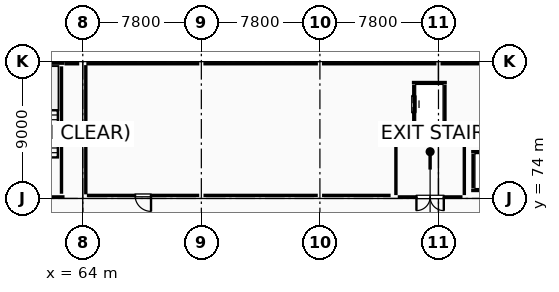
"""IFC4 building model, lengths in metres.
Left out: names, types, materials, properties, quantities, classifications, styles, units other than length and angle.
Written with IfcOpenShell. Run it as: python <this file> out.ifc"""

import sys

from ifc_helpers import new_model, si_unit, direction, frame, frame_2d, origin, origin_2d, place, context, subcontext, project, spatial, rectangle, hollow_rectangle, i_section, extrude, element, fill, save


model = new_model("IFC4")
c1 = context("Model", 3, precision=1e-05, world=origin(), true_north=direction((0.0, 1.0)))
c2 = subcontext(c1, "Body", "Model", "MODEL_VIEW")
j1 = project(units=[si_unit("LENGTHUNIT", "METRE"), si_unit("PLANEANGLEUNIT", "RADIAN")], contexts=[c1])
p1 = place(None, origin())
s1 = spatial("IfcSite", under=j1, at=p1, CompositionType="ELEMENT")
p2 = place(p1, origin())
s2 = spatial("IfcBuilding", under=s1, at=p2, CompositionType="ELEMENT")
p3 = place(p2, frame((0.0, 0.0, 19.8)))
s3 = spatial("IfcBuildingStorey", under=s2, at=p3, CompositionType="ELEMENT", Elevation=19.8)
p4 = place(p3, frame((64.0, 74.0, 0.0), z_axis=(0.0, 0.0, 1.0), x_axis=(1.0, 0.0, 0.0)))
e1 = element("IfcColumn", 1, at=p4, inside=s3, PredefinedType="COLUMN", context=c2, shape_type="SweptSolid", body=[
    extrude(i_section(OverallWidth=0.25, OverallDepth=0.45, WebThickness=0.011, FlangeThickness=0.014, FilletRadius=0.015, at=origin_2d()), origin(), (0.0, 0.0, 1.0), 4.5),
])
p5 = place(p3, frame((64.0, 83.0, 0.0), z_axis=(0.0, 0.0, 1.0), x_axis=(1.0, 0.0, 0.0)))
e2 = element("IfcColumn", 2, at=p5, inside=s3, PredefinedType="COLUMN", context=c2, shape_type="SweptSolid", body=[
    extrude(hollow_rectangle(XDim=0.45, YDim=0.45, WallThickness=0.02, at=origin_2d()), origin(), (0.0, 0.0, 1.0), 4.5),
])
for number, where, z_axis, x_axis in (
    (3, (71.8, 74.0, 0.0), (0.0, 0.0, 1.0), (1.0, 0.0, 0.0)),
    (4, (71.8, 83.0, 0.0), (0.0, 0.0, 1.0), (1.0, 0.0, 0.0)),
    (5, (79.6, 74.0, 0.0), (0.0, 0.0, 1.0), (1.0, 0.0, 0.0)),
    (6, (79.6, 83.0, 0.0), (0.0, 0.0, 1.0), (1.0, 0.0, 0.0)),
    (7, (87.4, 83.0, 0.0), (0.0, 0.0, 1.0), (1.0, 0.0, 0.0)),
):
    element("IfcColumn", number, at=place(p3, frame(where, z_axis=z_axis, x_axis=x_axis)), inside=s3, PredefinedType="COLUMN", context=c2, shape_type="SweptSolid", body=[
        extrude(i_section(OverallWidth=0.25, OverallDepth=0.45, WebThickness=0.011, FlangeThickness=0.014, FilletRadius=0.015, at=origin_2d()), origin(), (0.0, 0.0, 1.0), 4.5),
    ])
p6 = place(p3, frame((62.804, 82.86, 0.0), z_axis=(0.0, 0.0, 1.0), x_axis=(1.0, 0.0, 0.0)))
e8 = element("IfcWall", 8, at=p6, inside=s3, PredefinedType="ELEMENTEDWALL", context=c2, shape_type="SweptSolid", body=[
    extrude(rectangle(XDim=0.963, YDim=0.24, at=frame_2d((0.481, 0.0))), origin(), (0.0, 0.0, 1.0), 4.25),
])
p7 = place(p3, frame((64.233, 82.86, 0.0), z_axis=(0.0, 0.0, 1.0), x_axis=(1.0, 0.0, 0.0)))
e9 = element("IfcWall", 9, at=p7, inside=s3, PredefinedType="ELEMENTEDWALL", context=c2, shape_type="SweptSolid", body=[
    extrude(rectangle(XDim=7.434, YDim=0.24, at=frame_2d((3.717, 0.0))), origin(), (0.0, 0.0, 1.0), 3.485),
])
p8 = place(p3, frame((71.933, 82.86, 0.0), z_axis=(0.0, 0.0, 1.0), x_axis=(1.0, 0.0, 0.0)))
e10 = element("IfcWall", 10, at=p8, inside=s3, PredefinedType="ELEMENTEDWALL", context=c2, shape_type="SweptSolid", body=[
    extrude(rectangle(XDim=7.534, YDim=0.24, at=frame_2d((3.767, 0.0))), origin(), (0.0, 0.0, 1.0), 3.585),
])
p9 = place(p3, frame((79.733, 82.86, 0.0), z_axis=(0.0, 0.0, 1.0), x_axis=(1.0, 0.0, 0.0)))
e11 = element("IfcWall", 11, at=p9, inside=s3, PredefinedType="ELEMENTEDWALL", context=c2, shape_type="SweptSolid", body=[
    extrude(rectangle(XDim=7.534, YDim=0.24, at=frame_2d((3.767, 0.0))), origin(), (0.0, 0.0, 1.0), 3.785),
])
p10 = place(p3, frame((87.533, 82.86, 0.0), z_axis=(0.0, 0.0, 1.0), x_axis=(1.0, 0.0, 0.0)))
e12 = element("IfcWall", 12, at=p10, inside=s3, PredefinedType="ELEMENTEDWALL", context=c2, shape_type="SweptSolid", body=[
    extrude(rectangle(XDim=5.863, YDim=0.24, at=frame_2d((2.932, 0.0))), origin(), (0.0, 0.0, 1.0), 4.25),
])
p11 = place(p3, frame((54.4, 74.1, 0.0), z_axis=(0.0, 0.0, 1.0), x_axis=(1.0, 0.0, 0.0)))
e13 = element("IfcWall", 13, at=p11, inside=s3, PredefinedType="SHEAR", context=c2, shape_type="SweptSolid", body=[
    extrude(rectangle(XDim=8.4, YDim=0.4, at=frame_2d((4.2, 0.0))), origin(), (0.0, 0.0, 1.0), 4.25),
])
p12 = place(p11, frame((3.55, 0.0, 0.0)))
e14 = element("IfcOpeningElement", 14, at=p12, cuts=e13, PredefinedType="OPENING", context=c2, shape_type="SweptSolid", body=[
    extrude(rectangle(XDim=1.3, YDim=2.15, at=frame_2d((0.65, 1.075))), frame((0.0, 0.21, 0.0), z_axis=(0.0, -1.0, 0.0), x_axis=(1.0, 0.0, 0.0)), (0.0, 0.0, 1.0), 0.42),
])
p13 = place(p3, frame((62.8, 82.9, 0.0), z_axis=(0.0, 0.0, 1.0), x_axis=(-1.0, 0.0, 0.0)))
e15 = element("IfcWall", 15, at=p13, inside=s3, PredefinedType="SHEAR", context=c2, shape_type="SweptSolid", body=[
    extrude(rectangle(XDim=8.4, YDim=0.4, at=frame_2d((4.2, 0.0))), origin(), (0.0, 0.0, 1.0), 4.25),
])
p14 = place(p3, frame((62.6, 74.31, 0.0), z_axis=(0.0, 0.0, 1.0), x_axis=(0.0, 1.0, 0.0)))
e16 = element("IfcWall", 16, at=p14, inside=s3, PredefinedType="SHEAR", context=c2, shape_type="SweptSolid", body=[
    extrude(rectangle(XDim=8.38, YDim=0.4, at=frame_2d((4.19, 0.0))), origin(), (0.0, 0.0, 1.0), 4.25),
])
p15 = place(p3, frame((89.55, 74.525, 0.0), z_axis=(0.0, 0.0, 1.0), x_axis=(1.0, 0.0, 0.0)))
e17 = element("IfcWall", 17, at=p15, inside=s3, PredefinedType="STANDARD", context=c2, shape_type="SweptSolid", body=[
    extrude(rectangle(XDim=2.5, YDim=0.25, at=frame_2d((1.25, 0.0))), origin(), (0.0, 0.0, 1.0), 4.24),
])
p16 = place(p15, frame((0.65, 0.0, 0.0)))
e18 = element("IfcOpeningElement", 18, at=p16, cuts=e17, PredefinedType="OPENING", context=c2, shape_type="SweptSolid", body=[
    extrude(rectangle(XDim=1.2, YDim=2.05, at=frame_2d((0.6, 1.025))), frame((0.0, 0.135, 0.0), z_axis=(0.0, -1.0, 0.0), x_axis=(1.0, 0.0, 0.0)), (0.0, 0.0, 1.0), 0.27),
])
p17 = place(p3, frame((92.05, 77.075, 0.0), z_axis=(0.0, 0.0, 1.0), x_axis=(-1.0, 0.0, 0.0)))
e19 = element("IfcWall", 19, at=p17, inside=s3, PredefinedType="STANDARD", context=c2, shape_type="SweptSolid", body=[
    extrude(rectangle(XDim=2.5, YDim=0.25, at=frame_2d((1.25, 0.0))), origin(), (0.0, 0.0, 1.0), 4.24),
])
p18 = place(p3, frame((89.675, 76.94, 0.0), z_axis=(0.0, 0.0, 1.0), x_axis=(0.0, -1.0, 0.0)))
e20 = element("IfcWall", 20, at=p18, inside=s3, PredefinedType="STANDARD", context=c2, shape_type="SweptSolid", body=[
    extrude(rectangle(XDim=2.28, YDim=0.25, at=frame_2d((1.14, 0.0))), origin(), (0.0, 0.0, 1.0), 4.24),
])
for number, where, z_axis, x_axis in (
    (21, (85.65, 78.775, 0.0), (0.0, 0.0, 1.0), (1.0, 0.0, 0.0)),
    (22, (87.95, 81.625, 0.0), (0.0, 0.0, 1.0), (-1.0, 0.0, 0.0)),
):
    element("IfcWall", number, at=place(p3, frame(where, z_axis=z_axis, x_axis=x_axis)), inside=s3, PredefinedType="STANDARD", context=c2, shape_type="SweptSolid", body=[
        extrude(rectangle(XDim=2.3, YDim=0.25, at=frame_2d((1.15, 0.0))), origin(), (0.0, 0.0, 1.0), 4.24),
    ])
p19 = place(p3, frame((87.825, 78.91, 0.0), z_axis=(0.0, 0.0, 1.0), x_axis=(0.0, 1.0, 0.0)))
e23 = element("IfcWall", 23, at=p19, inside=s3, PredefinedType="STANDARD", context=c2, shape_type="SweptSolid", body=[
    extrude(rectangle(XDim=2.58, YDim=0.25, at=frame_2d((1.29, 0.0))), origin(), (0.0, 0.0, 1.0), 4.24),
])
p20 = place(p3, frame((85.775, 81.49, 0.0), z_axis=(0.0, 0.0, 1.0), x_axis=(0.0, -1.0, 0.0)))
e24 = element("IfcWall", 24, at=p20, inside=s3, PredefinedType="STANDARD", context=c2, shape_type="SweptSolid", body=[
    extrude(rectangle(XDim=2.58, YDim=0.25, at=frame_2d((1.29, 0.0))), origin(), (0.0, 0.0, 1.0), 4.24),
])
p21 = place(p20, frame((0.74, 0.0, 0.0)))
e25 = element("IfcOpeningElement", 25, at=p21, cuts=e24, PredefinedType="OPENING", context=c2, shape_type="SweptSolid", body=[
    extrude(rectangle(XDim=1.1, YDim=2.15, at=frame_2d((0.55, 1.075))), frame((0.0, 0.135, 0.0), z_axis=(0.0, -1.0, 0.0), x_axis=(1.0, 0.0, 0.0)), (0.0, 0.0, 1.0), 0.27),
])
p22 = place(p3, frame((84.6, 74.22, 0.0), z_axis=(0.0, 0.0, 1.0), x_axis=(0.0, 1.0, 0.0)))
e26 = element("IfcWall", 26, at=p22, inside=s3, PredefinedType="PARTITIONING", context=c2, shape_type="SweptSolid", body=[
    extrude(rectangle(XDim=3.36, YDim=0.2, at=frame_2d((1.68, 0.0))), origin(), (0.0, 0.0, 1.0), 4.24),
])
p23 = place(p3, frame((84.72, 77.7, 0.0), z_axis=(0.0, 0.0, 1.0), x_axis=(1.0, 0.0, 0.0)))
e27 = element("IfcWall", 27, at=p23, inside=s3, PredefinedType="PARTITIONING", context=c2, shape_type="SweptSolid", body=[
    extrude(rectangle(XDim=4.26, YDim=0.2, at=frame_2d((2.13, 0.0))), origin(), (0.0, 0.0, 1.0), 4.24),
])
p24 = place(p3, frame((89.1, 77.58, 0.0), z_axis=(0.0, 0.0, 1.0), x_axis=(0.0, -1.0, 0.0)))
e28 = element("IfcWall", 28, at=p24, inside=s3, PredefinedType="PARTITIONING", context=c2, shape_type="SweptSolid", body=[
    extrude(rectangle(XDim=3.36, YDim=0.2, at=frame_2d((1.68, 0.0))), origin(), (0.0, 0.0, 1.0), 4.24),
])
p25 = place(p3, frame((88.98, 74.1, 0.0), z_axis=(0.0, 0.0, 1.0), x_axis=(-1.0, 0.0, 0.0)))
e29 = element("IfcWall", 29, at=p25, inside=s3, PredefinedType="PARTITIONING", context=c2, shape_type="SweptSolid", body=[
    extrude(rectangle(XDim=4.26, YDim=0.2, at=frame_2d((2.13, 0.0))), origin(), (0.0, 0.0, 1.0), 4.24),
])
p26 = place(p25, frame((1.23, 0.0, 0.0)))
e30 = element("IfcOpeningElement", 30, at=p26, cuts=e29, PredefinedType="OPENING", context=c2, shape_type="SweptSolid", body=[
    extrude(rectangle(XDim=1.8, YDim=2.15, at=frame_2d((0.9, 1.075))), frame((0.0, 0.11, 0.0), z_axis=(0.0, -1.0, 0.0), x_axis=(1.0, 0.0, 0.0)), (0.0, 0.0, 1.0), 0.22),
])
p27 = place(p3, frame((64.2, 74.27, 0.0), z_axis=(0.0, 0.0, 1.0), x_axis=(0.0, 1.0, 0.0)))
e31 = element("IfcWall", 31, at=p27, inside=s3, PredefinedType="PARTITIONING", context=c2, shape_type="SweptSolid", body=[
    extrude(rectangle(XDim=8.501, YDim=0.1, at=frame_2d((4.25, 0.0))), origin(), (0.0, 0.0, 1.0), 3.48),
])
p28 = place(p27, frame((3.605, 0.0, 0.0)))
e32 = element("IfcOpeningElement", 32, at=p28, cuts=e31, PredefinedType="OPENING", context=c2, shape_type="SweptSolid", body=[
    extrude(rectangle(XDim=1.05, YDim=2.15, at=frame_2d((0.525, 1.075))), frame((0.0, 0.06, 0.0), z_axis=(0.0, -1.0, 0.0), x_axis=(1.0, 0.0, 0.0)), (0.0, 0.0, 1.0), 0.12),
])
p29 = place(p3, frame((84.25, 74.2, 0.0), z_axis=(0.0, 0.0, 1.0), x_axis=(-1.0, 0.0, 0.0)))
e33 = element("IfcWall", 33, at=p29, inside=s3, PredefinedType="PARTITIONING", context=c2, shape_type="SweptSolid", body=[
    extrude(rectangle(XDim=4.51, YDim=0.1, at=frame_2d((2.255, 0.0))), origin(), (0.0, 0.0, 1.0), 4.24),
])
p30 = place(p3, frame((79.46, 74.2, 0.0), z_axis=(0.0, 0.0, 1.0), x_axis=(-1.0, 0.0, 0.0)))
e34 = element("IfcWall", 34, at=p30, inside=s3, PredefinedType="PARTITIONING", context=c2, shape_type="SweptSolid", body=[
    extrude(rectangle(XDim=7.52, YDim=0.1, at=frame_2d((3.76, 0.0))), origin(), (0.0, 0.0, 1.0), 3.23),
])
p31 = place(p3, frame((71.66, 74.2, 0.0), z_axis=(0.0, 0.0, 1.0), x_axis=(-1.0, 0.0, 0.0)))
e35 = element("IfcWall", 35, at=p31, inside=s3, PredefinedType="PARTITIONING", context=c2, shape_type="SweptSolid", body=[
    extrude(rectangle(XDim=7.39, YDim=0.1, at=frame_2d((3.695, 0.0))), origin(), (0.0, 0.0, 1.0), 3.78),
])
p32 = place(p31, frame((3.17, 0.0, 0.0)))
e36 = element("IfcOpeningElement", 36, at=p32, cuts=e35, PredefinedType="OPENING", context=c2, shape_type="SweptSolid", body=[
    extrude(rectangle(XDim=1.05, YDim=2.15, at=frame_2d((0.525, 1.075))), frame((0.0, 0.06, 0.0), z_axis=(0.0, -1.0, 0.0), x_axis=(1.0, 0.0, 0.0)), (0.0, 0.0, 1.0), 0.12),
])
p33 = place(p21, origin())
e37 = element("IfcDoor", 37, at=p33, inside=s3, OperationType="DOUBLE_DOOR_SLIDING", PredefinedType="DOOR", context=c2, shape_type="SweptSolid", body=[
    extrude(rectangle(XDim=1.1, YDim=2.15, at=frame_2d((0.55, 1.075))), frame((0.0, 0.025, 0.0), z_axis=(0.0, -1.0, 0.0), x_axis=(1.0, 0.0, 0.0)), (0.0, 0.0, 1.0), 0.05),
])
fill(e25, e37)
p34 = place(p26, origin())
e38 = element("IfcDoor", 38, at=p34, inside=s3, OperationType="DOUBLE_DOOR_SINGLE_SWING", PredefinedType="DOOR", context=c2, shape_type="SweptSolid", body=[
    extrude(rectangle(XDim=1.8, YDim=2.15, at=frame_2d((0.9, 1.075))), frame((0.0, 0.025, 0.0), z_axis=(0.0, -1.0, 0.0), x_axis=(1.0, 0.0, 0.0)), (0.0, 0.0, 1.0), 0.05),
])
fill(e30, e38)
p35 = place(p32, origin())
e39 = element("IfcDoor", 39, at=p35, inside=s3, OperationType="SINGLE_SWING_LEFT", PredefinedType="DOOR", context=c2, shape_type="SweptSolid", body=[
    extrude(rectangle(XDim=1.05, YDim=2.15, at=frame_2d((0.525, 1.075))), frame((0.0, 0.025, 0.0), z_axis=(0.0, -1.0, 0.0), x_axis=(1.0, 0.0, 0.0)), (0.0, 0.0, 1.0), 0.05),
])
fill(e36, e39)
p36 = place(p28, origin())
e40 = element("IfcDoor", 40, at=p36, inside=s3, OperationType="SINGLE_SWING_RIGHT", PredefinedType="DOOR", context=c2, shape_type="SweptSolid", body=[
    extrude(rectangle(XDim=1.05, YDim=2.15, at=frame_2d((0.525, 1.075))), frame((0.0, 0.025, 0.0), z_axis=(0.0, -1.0, 0.0), x_axis=(1.0, 0.0, 0.0)), (0.0, 0.0, 1.0), 0.05),
])
fill(e32, e40)
save(model, sys.argv[1])
